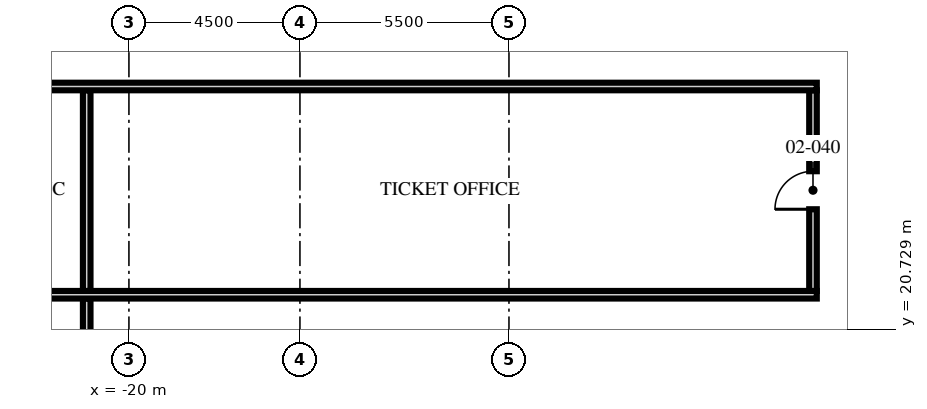
"""IFC4 building model, lengths in metres.
Left out: names, types, materials, properties, quantities, classifications, styles, units other than length and angle.
Written with IfcOpenShell. Run it as: python <this file> out.ifc"""

import sys

from ifc_helpers import new_model, si_unit, direction, frame, frame_2d, origin, place, context, subcontext, project, spatial, rectangle, extrude, element, fill, save


model = new_model("IFC4")
c1 = context("Model", 3, precision=1e-05, world=origin(), true_north=direction((0.0, 1.0)))
c2 = subcontext(c1, "Body", "Model", "MODEL_VIEW")
j1 = project(units=[si_unit("LENGTHUNIT", "METRE"), si_unit("PLANEANGLEUNIT", "RADIAN")], contexts=[c1])
p1 = place(None, origin())
s1 = spatial("IfcSite", under=j1, at=p1, CompositionType="ELEMENT")
p2 = place(p1, origin())
s2 = spatial("IfcBuilding", under=s1, at=p2, CompositionType="ELEMENT")
p3 = place(p2, frame((0.0, 0.0, 11.0)))
s3 = spatial("IfcBuildingStorey", under=s2, at=p3, CompositionType="ELEMENT", Elevation=11.0)
p4 = place(p3, frame((-21.111, -20.491, 0.0), z_axis=(0.0, 0.0, 1.0), x_axis=(0.0, 1.0, 0.0)))
e1 = element("IfcWall", 1, at=p4, inside=s3, PredefinedType="SOLIDWALL", context=c2, shape_type="SweptSolid", body=[
    extrude(rectangle(XDim=42.022, YDim=0.2, at=frame_2d((21.011, 0.0))), origin(), (0.0, 0.0, 1.0), 3.5),
])
p5 = place(p4, frame((6.352, 0.0, 0.0)))
e2 = element("IfcOpeningElement", 2, at=p5, cuts=e1, PredefinedType="OPENING", context=c2, shape_type="SweptSolid", body=[
    extrude(rectangle(XDim=1.0, YDim=2.1, at=frame_2d((0.5, 1.05))), frame((0.0, 0.11, 0.0), z_axis=(0.0, -1.0, 0.0), x_axis=(1.0, 0.0, 0.0)), (0.0, 0.0, 1.0), 0.22),
])
p6 = place(p4, frame((16.054, 0.0, 0.0)))
e3 = element("IfcOpeningElement", 3, at=p6, cuts=e1, PredefinedType="OPENING", context=c2, shape_type="SweptSolid", body=[
    extrude(rectangle(XDim=1.0, YDim=2.1, at=frame_2d((0.5, 1.05))), frame((0.0, 0.11, 0.0), z_axis=(0.0, -1.0, 0.0), x_axis=(1.0, 0.0, 0.0)), (0.0, 0.0, 1.0), 0.22),
])
p7 = place(p4, frame((23.016, 0.0, 0.0)))
e4 = element("IfcOpeningElement", 4, at=p7, cuts=e1, PredefinedType="OPENING", context=c2, shape_type="SweptSolid", body=[
    extrude(rectangle(XDim=1.0, YDim=2.1, at=frame_2d((0.5, 1.05))), frame((0.0, 0.11, 0.0), z_axis=(0.0, -1.0, 0.0), x_axis=(1.0, 0.0, 0.0)), (0.0, 0.0, 1.0), 0.22),
])
p8 = place(p4, frame((31.46, 0.0, 0.0)))
e5 = element("IfcOpeningElement", 5, at=p8, cuts=e1, PredefinedType="OPENING", context=c2, shape_type="SweptSolid", body=[
    extrude(rectangle(XDim=1.0, YDim=2.1, at=frame_2d((0.5, 1.05))), frame((0.0, 0.11, 0.0), z_axis=(0.0, -1.0, 0.0), x_axis=(1.0, 0.0, 0.0)), (0.0, 0.0, 1.0), 0.22),
])
p9 = place(p4, frame((38.647, 0.0, 0.0)))
e6 = element("IfcOpeningElement", 6, at=p9, cuts=e1, PredefinedType="OPENING", context=c2, shape_type="SweptSolid", body=[
    extrude(rectangle(XDim=1.0, YDim=2.1, at=frame_2d((0.5, 1.05))), frame((0.0, 0.11, 0.0), z_axis=(0.0, -1.0, 0.0), x_axis=(1.0, 0.0, 0.0)), (0.0, 0.0, 1.0), 0.22),
])
p10 = place(p3, frame((-28.85, 21.631, 0.0), z_axis=(0.0, 0.0, 1.0), x_axis=(1.0, 0.0, 0.0)))
e7 = element("IfcWall", 7, at=p10, inside=s3, PredefinedType="SOLIDWALL", context=c2, shape_type="SweptSolid", body=[
    extrude(rectangle(XDim=26.95, YDim=0.2, at=frame_2d((13.475, 0.0))), origin(), (0.0, 0.0, 1.0), 3.5),
])
p11 = place(p3, frame((-21.111, 21.731, 0.0), z_axis=(0.0, 0.0, 1.0), x_axis=(0.0, 1.0, 0.0)))
e8 = element("IfcWall", 8, at=p11, inside=s3, PredefinedType="SOLIDWALL", context=c2, shape_type="SweptSolid", body=[
    extrude(rectangle(XDim=5.28, YDim=0.2, at=frame_2d((2.64, 0.0))), origin(), (0.0, 0.0, 1.0), 4.7),
])
p12 = place(p3, frame((-2.0, 21.731, 0.0), z_axis=(0.0, 0.0, 1.0), x_axis=(0.0, 1.0, 0.0)))
e9 = element("IfcWall", 9, at=p12, inside=s3, PredefinedType="SOLIDWALL", context=c2, shape_type="SweptSolid", body=[
    extrude(rectangle(XDim=5.28, YDim=0.2, at=frame_2d((2.64, 0.0))), origin(), (0.0, 0.0, 1.0), 4.7),
])
p13 = place(p12, frame((2.15, 0.0, 0.0)))
e10 = element("IfcOpeningElement", 10, at=p13, cuts=e9, PredefinedType="OPENING", context=c2, shape_type="SweptSolid", body=[
    extrude(rectangle(XDim=1.0, YDim=2.1, at=frame_2d((0.5, 1.05))), frame((0.0, 0.11, 0.0), z_axis=(0.0, -1.0, 0.0), x_axis=(1.0, 0.0, 0.0)), (0.0, 0.0, 1.0), 0.22),
])
p14 = place(p3, frame((-38.075, 27.111, 0.0), z_axis=(0.0, 0.0, 1.0), x_axis=(1.0, 0.0, 0.0)))
e11 = element("IfcWall", 11, at=p14, inside=s3, PredefinedType="SOLIDWALL", context=c2, shape_type="SweptSolid", body=[
    extrude(rectangle(XDim=36.175, YDim=0.2, at=frame_2d((18.087, 0.0))), origin(), (0.0, 0.0, 1.0), 3.5),
])
p15 = place(p14, frame((3.115, 0.0, 0.0)))
e12 = element("IfcOpeningElement", 12, at=p15, cuts=e11, PredefinedType="OPENING", context=c2, shape_type="SweptSolid", body=[
    extrude(rectangle(XDim=0.9, YDim=2.1, at=frame_2d((0.45, 1.05))), frame((0.0, 0.11, 0.0), z_axis=(0.0, -1.0, 0.0), x_axis=(1.0, 0.0, 0.0)), (0.0, 0.0, 1.0), 0.22),
])
p16 = place(p14, frame((11.227, 0.0, 0.0)))
e13 = element("IfcOpeningElement", 13, at=p16, cuts=e11, PredefinedType="OPENING", context=c2, shape_type="SweptSolid", body=[
    extrude(rectangle(XDim=1.0, YDim=2.1, at=frame_2d((0.5, 1.05))), frame((0.0, 0.11, 0.0), z_axis=(0.0, -1.0, 0.0), x_axis=(1.0, 0.0, 0.0)), (0.0, 0.0, 1.0), 0.22),
])
p17 = place(p14, frame((14.469, 0.0, 0.0)))
e14 = element("IfcOpeningElement", 14, at=p17, cuts=e11, PredefinedType="OPENING", context=c2, shape_type="SweptSolid", body=[
    extrude(rectangle(XDim=0.9, YDim=2.1, at=frame_2d((0.45, 1.05))), frame((0.0, 0.11, 0.0), z_axis=(0.0, -1.0, 0.0), x_axis=(1.0, 0.0, 0.0)), (0.0, 0.0, 1.0), 0.22),
])
p18 = place(p13, origin())
e15 = element("IfcDoor", 15, at=p18, inside=s3, OperationType="SINGLE_SWING_LEFT", PredefinedType="DOOR", context=c2, shape_type="SweptSolid", body=[
    extrude(rectangle(XDim=1.0, YDim=2.1, at=frame_2d((0.5, 1.05))), frame((0.0, 0.025, 0.0), z_axis=(0.0, -1.0, 0.0), x_axis=(1.0, 0.0, 0.0)), (0.0, 0.0, 1.0), 0.05),
])
fill(e10, e15)
save(model, sys.argv[1])
